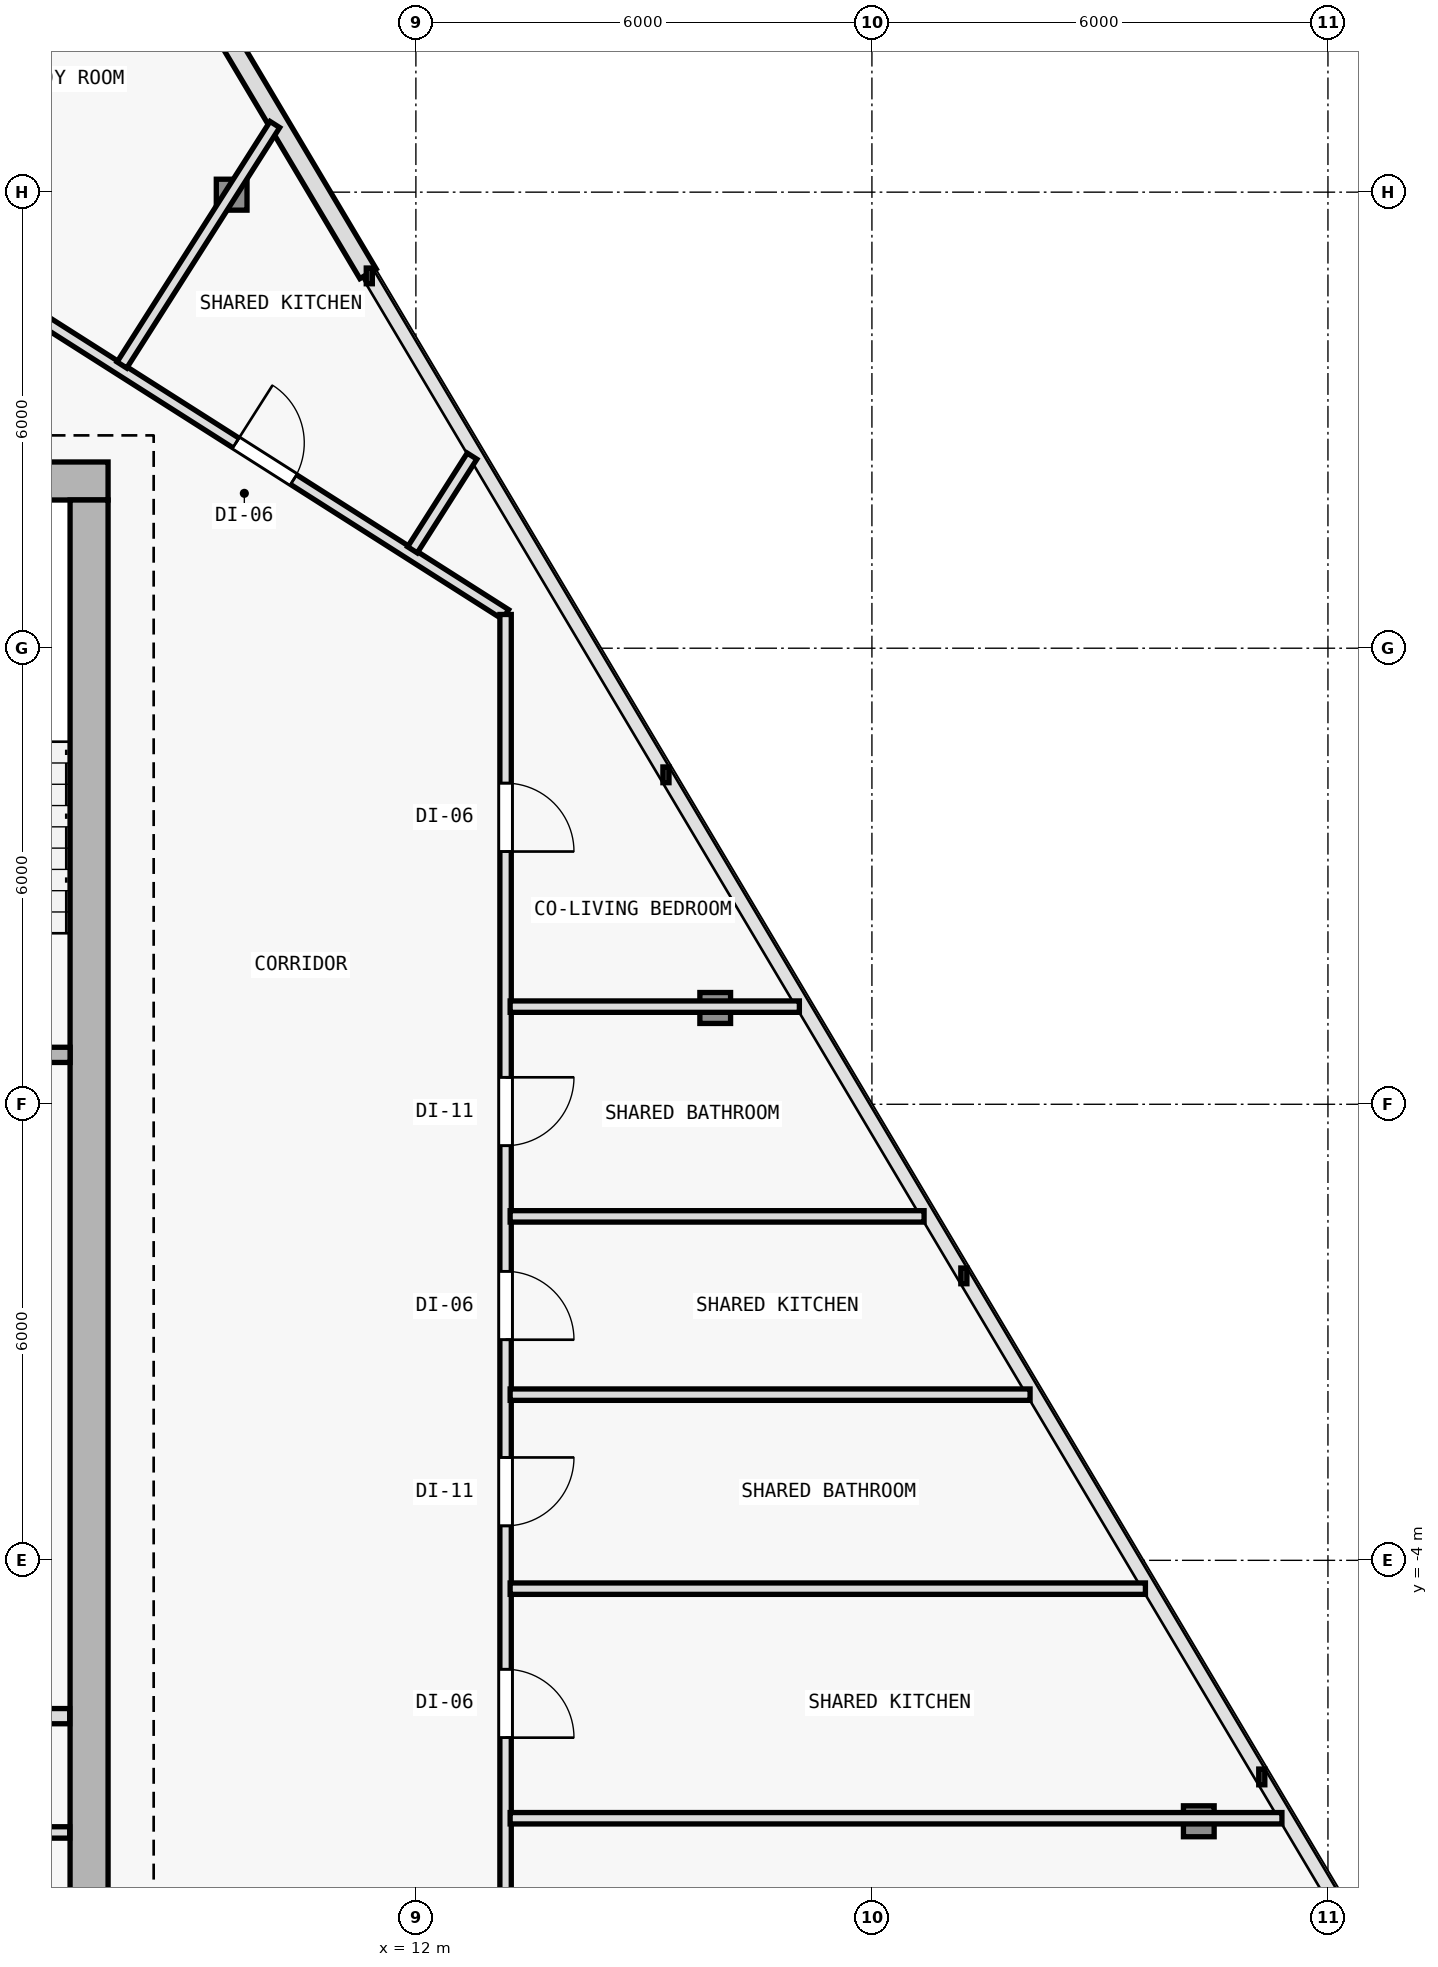
"""IFC4 building model, lengths in metres.
Left out: names, types, materials, properties, quantities, classifications, styles, units other than length and angle.
Written with IfcOpenShell. Run it as: python <this file> out.ifc"""

import sys

from ifc_helpers import new_model, si_unit, direction, frame, frame_2d, origin, origin_2d, place, context, subcontext, project, spatial, rectangle, i_section, extrude, element, fill, save


model = new_model("IFC4")
c1 = context("Model", 3, precision=1e-05, world=origin(), true_north=direction((0.0, 1.0)))
c2 = subcontext(c1, "Body", "Model", "MODEL_VIEW")
j1 = project(units=[si_unit("LENGTHUNIT", "METRE"), si_unit("PLANEANGLEUNIT", "RADIAN")], contexts=[c1])
p1 = place(None, origin())
s1 = spatial("IfcSite", under=j1, at=p1, CompositionType="ELEMENT")
p2 = place(p1, origin())
s2 = spatial("IfcBuilding", under=s1, at=p2, CompositionType="ELEMENT")
p3 = place(p2, frame((0.0, 0.0, 142.2)))
s3 = spatial("IfcBuildingStorey", under=s2, at=p3, CompositionType="ELEMENT", Elevation=142.2)
for number, where, z_axis, x_axis in (
    (1, (7.7, 10.2, 0.0), (0.0, 0.0, 1.0), (1.0, 0.0, 0.0)),
    (2, (7.7, 0.4, 0.0), (0.0, 0.0, 1.0), (1.0, 0.0, 0.0)),
):
    element("IfcColumn", number, at=place(p3, frame(where, z_axis=z_axis, x_axis=x_axis)), inside=s3, PredefinedType="COLUMN", context=c2, shape_type="SweptSolid", body=[
        extrude(i_section(OverallWidth=0.404, OverallDepth=0.407, WebThickness=0.017, FlangeThickness=0.028, FilletRadius=0.015, at=origin_2d()), origin(), (0.0, 0.0, 1.0), 3.6),
    ])
p4 = place(p3, frame((22.301, -7.433, 0.006), z_axis=(-0.026854414067, 0.022231375696, 0.99939211843), x_axis=(-0.637687438134, -0.770295223434, 0.0)))
e3 = element("IfcColumn", 3, at=p4, inside=s3, PredefinedType="COLUMN", context=c2, shape_type="SweptSolid", body=[
    extrude(i_section(OverallWidth=0.404, OverallDepth=0.407, WebThickness=0.017, FlangeThickness=0.028, FilletRadius=0.015, at=origin_2d()), origin(), (0.0, 0.0, 1.0), 3.591),
])
p5 = place(p3, frame((15.938, 3.267, 0.006), z_axis=(-0.019383182712, 0.009793608107, 0.999764160924), x_axis=(-0.45096771224, -0.892540263807, 0.0)))
e4 = element("IfcColumn", 4, at=p5, inside=s3, PredefinedType="COLUMN", context=c2, shape_type="SweptSolid", body=[
    extrude(i_section(OverallWidth=0.404, OverallDepth=0.407, WebThickness=0.017, FlangeThickness=0.028, FilletRadius=0.015, at=origin_2d()), origin(), (0.0, 0.0, 1.0), 3.59),
])
p6 = place(p3, frame((9.576, 13.967, 0.006), z_axis=(-0.012039901208, -0.002652859588, 0.999923998669), x_axis=(0.215177531037, -0.976574948551, 0.0)))
e5 = element("IfcColumn", 5, at=p6, inside=s3, PredefinedType="COLUMN", context=c2, shape_type="SweptSolid", body=[
    extrude(i_section(OverallWidth=0.404, OverallDepth=0.407, WebThickness=0.017, FlangeThickness=0.028, FilletRadius=0.015, at=origin_2d()), origin(), (0.0, 0.0, 1.0), 3.589),
])
p7 = place(p3, frame((5.862, 22.19, 0.0), z_axis=(0.0, 0.0, 1.0), x_axis=(0.511083986456, -0.859530778267, 0.0)))
e6 = element("IfcWall", 6, at=p7, inside=s3, PredefinedType="SOLIDWALL", context=c2, shape_type="SweptSolid", body=[
    extrude(rectangle(XDim=10.778, YDim=0.25, at=frame_2d((5.389, 0.0))), origin(), (0.0, 0.0, 1.0), 3.35),
])
p8 = place(p7, frame((4.839, 0.0, 0.62)))
e7 = element("IfcOpeningElement", 7, at=p8, cuts=e6, PredefinedType="OPENING", context=c2, shape_type="SweptSolid", body=[
    extrude(rectangle(XDim=1.1, YDim=1.8, at=frame_2d((0.55, 0.9))), frame((0.0, 0.135, 0.0), z_axis=(0.0, -1.0, 0.0), x_axis=(1.0, 0.0, 0.0)), (0.0, 0.0, 1.0), 0.27),
])
p9 = place(p3, frame((7.95, 10.2, 0.0), z_axis=(0.0, 0.0, 1.0), x_axis=(-1.0, 0.0, 0.0)))
e8 = element("IfcWall", 8, at=p9, inside=s3, PredefinedType="SHEAR", context=c2, shape_type="SweptSolid", body=[
    extrude(rectangle(XDim=15.9, YDim=0.5, at=frame_2d((7.95, 0.0))), origin(), (0.0, 0.0, 1.0), 3.35),
])
p10 = place(p9, frame((4.4, 0.0, 0.0)))
e9 = element("IfcOpeningElement", 9, at=p10, cuts=e8, PredefinedType="OPENING", context=c2, shape_type="SweptSolid", body=[
    extrude(rectangle(XDim=1.1, YDim=2.15, at=frame_2d((0.55, 1.075))), frame((0.0, 0.26, 0.0), z_axis=(0.0, -1.0, 0.0), x_axis=(1.0, 0.0, 0.0)), (0.0, 0.0, 1.0), 0.52),
])
p11 = place(p3, frame((7.7, 9.95, 0.0), z_axis=(0.0, 0.0, 1.0), x_axis=(0.0, -1.0, 0.0)))
e10 = element("IfcWall", 10, at=p11, inside=s3, PredefinedType="SHEAR", context=c2, shape_type="SweptSolid", body=[
    extrude(rectangle(XDim=19.1, YDim=0.5, at=frame_2d((9.55, 0.0))), origin(), (0.0, 0.0, 1.0), 3.35),
])
p12 = place(p3, frame((4.05, 2.65, 0.0), z_axis=(0.0, 0.0, 1.0), x_axis=(1.0, 0.0, 0.0)))
e11 = element("IfcWall", 11, at=p12, inside=s3, PredefinedType="SOLIDWALL", context=c2, shape_type="SweptSolid", body=[
    extrude(rectangle(XDim=3.4, YDim=0.2, at=frame_2d((1.7, 0.0))), origin(), (0.0, 0.0, 1.0), 3.35),
])
p13 = place(p3, frame((4.15, -6.05, 0.0), z_axis=(0.0, 0.0, 1.0), x_axis=(1.0, 0.0, 0.0)))
e12 = element("IfcWall", 12, at=p13, inside=s3, PredefinedType="SOLIDWALL", context=c2, shape_type="SweptSolid", body=[
    extrude(rectangle(XDim=3.295, YDim=0.2, at=frame_2d((1.647, 0.0))), origin(), (0.0, 0.0, 1.0), 3.35),
])
p14 = place(p3, frame((4.15, -7.58, 0.0), z_axis=(0.0, 0.0, 1.0), x_axis=(1.0, 0.0, 0.0)))
e13 = element("IfcWall", 13, at=p14, inside=s3, PredefinedType="PARTITIONING", context=c2, shape_type="SweptSolid", body=[
    extrude(rectangle(XDim=3.295, YDim=0.15, at=frame_2d((1.647, 0.0))), origin(), (0.0, 0.0, 1.0), 3.35),
])
p15 = place(p3, frame((7.023, 12.36, 0.0), z_axis=(0.0, 0.0, 1.0), x_axis=(0.84376480085, -0.536713108511, 0.0)))
e14 = element("IfcWall", 14, at=p15, inside=s3, PredefinedType="PARTITIONING", context=c2, shape_type="SweptSolid", body=[
    extrude(rectangle(XDim=7.297, YDim=0.15, at=frame_2d((3.648, 0.0))), origin(), (0.0, 0.0, 1.0), 2.885),
])
p16 = place(p15, frame((3.091, 0.0, 0.0)))
e15 = element("IfcOpeningElement", 15, at=p16, cuts=e14, PredefinedType="OPENING", context=c2, shape_type="SweptSolid", body=[
    extrude(rectangle(XDim=0.9, YDim=2.1, at=frame_2d((0.45, 1.05))), frame((0.0, 0.085, 0.0), z_axis=(0.0, -1.0, 0.0), x_axis=(1.0, 0.0, 0.0)), (0.0, 0.0, 1.0), 0.17),
])
p17 = place(p3, frame((13.18, 8.444, 0.0), z_axis=(0.0, 0.0, 1.0), x_axis=(0.0, -1.0, 0.0)))
e16 = element("IfcWall", 16, at=p17, inside=s3, PredefinedType="PARTITIONING", context=c2, shape_type="SweptSolid", body=[
    extrude(rectangle(XDim=20.004, YDim=0.15, at=frame_2d((10.002, 0.0))), origin(), (0.0, 0.0, 1.0), 2.705),
])
p18 = place(p17, frame((17.381, 0.0, 0.0)))
e17 = element("IfcOpeningElement", 17, at=p18, cuts=e16, PredefinedType="OPENING", context=c2, shape_type="SweptSolid", body=[
    extrude(rectangle(XDim=0.9, YDim=2.1, at=frame_2d((0.45, 1.05))), frame((0.0, 0.085, 0.0), z_axis=(0.0, -1.0, 0.0), x_axis=(1.0, 0.0, 0.0)), (0.0, 0.0, 1.0), 0.17),
])
p19 = place(p17, frame((13.877, 0.0, 0.0)))
e18 = element("IfcOpeningElement", 18, at=p19, cuts=e16, PredefinedType="OPENING", context=c2, shape_type="SweptSolid", body=[
    extrude(rectangle(XDim=0.9, YDim=2.1, at=frame_2d((0.45, 1.05))), frame((0.0, 0.085, 0.0), z_axis=(0.0, -1.0, 0.0), x_axis=(1.0, 0.0, 0.0)), (0.0, 0.0, 1.0), 0.17),
])
p20 = place(p17, frame((11.09, 0.0, 0.0)))
e19 = element("IfcOpeningElement", 19, at=p20, cuts=e16, PredefinedType="OPENING", context=c2, shape_type="SweptSolid", body=[
    extrude(rectangle(XDim=0.9, YDim=2.1, at=frame_2d((0.45, 1.05))), frame((0.0, 0.085, 0.0), z_axis=(0.0, -1.0, 0.0), x_axis=(1.0, 0.0, 0.0)), (0.0, 0.0, 1.0), 0.17),
])
p21 = place(p17, frame((8.642, 0.0, 0.0)))
e20 = element("IfcOpeningElement", 20, at=p21, cuts=e16, PredefinedType="OPENING", context=c2, shape_type="SweptSolid", body=[
    extrude(rectangle(XDim=0.9, YDim=2.1, at=frame_2d((0.45, 1.05))), frame((0.0, 0.085, 0.0), z_axis=(0.0, -1.0, 0.0), x_axis=(1.0, 0.0, 0.0)), (0.0, 0.0, 1.0), 0.17),
])
p22 = place(p17, frame((6.089, 0.0, 0.0)))
e21 = element("IfcOpeningElement", 21, at=p22, cuts=e16, PredefinedType="OPENING", context=c2, shape_type="SweptSolid", body=[
    extrude(rectangle(XDim=0.9, YDim=2.1, at=frame_2d((0.45, 1.05))), frame((0.0, 0.085, 0.0), z_axis=(0.0, -1.0, 0.0), x_axis=(1.0, 0.0, 0.0)), (0.0, 0.0, 1.0), 0.17),
])
p23 = place(p17, frame((2.219, 0.0, 0.0)))
e22 = element("IfcOpeningElement", 22, at=p23, cuts=e16, PredefinedType="OPENING", context=c2, shape_type="SweptSolid", body=[
    extrude(rectangle(XDim=0.9, YDim=2.1, at=frame_2d((0.45, 1.05))), frame((0.0, 0.085, 0.0), z_axis=(0.0, -1.0, 0.0), x_axis=(1.0, 0.0, 0.0)), (0.0, 0.0, 1.0), 0.17),
])
p24 = place(p3, frame((13.24, -7.393, 0.0), z_axis=(0.0, 0.0, 1.0), x_axis=(1.0, 0.0, 0.0)))
e23 = element("IfcWall", 23, at=p24, inside=s3, PredefinedType="PARTITIONING", context=c2, shape_type="SweptSolid", body=[
    extrude(rectangle(XDim=10.155, YDim=0.15, at=frame_2d((5.077, 0.0))), origin(), (0.0, 0.0, 1.0), 2.705),
])
p25 = place(p3, frame((13.24, 3.284, 0.0), z_axis=(0.0, 0.0, 1.0), x_axis=(1.0, 0.0, 0.0)))
e24 = element("IfcWall", 24, at=p25, inside=s3, PredefinedType="PARTITIONING", context=c2, shape_type="SweptSolid", body=[
    extrude(rectangle(XDim=3.805, YDim=0.15, at=frame_2d((1.903, 0.0))), origin(), (0.0, 0.0, 1.0), 2.885),
])
p26 = place(p3, frame((8.132, 11.726, 0.0), z_axis=(0.0, 0.0, 1.0), x_axis=(0.536677475356, 0.843787465803, 0.0)))
e25 = element("IfcWall", 25, at=p26, inside=s3, PredefinedType="PARTITIONING", context=c2, shape_type="SweptSolid", body=[
    extrude(rectangle(XDim=3.75, YDim=0.15, at=frame_2d((1.875, 0.0))), origin(), (0.0, 0.0, 1.0), 2.885),
])
p27 = place(p3, frame((13.24, -1.82, 0.0), z_axis=(0.0, 0.0, 1.0), x_axis=(1.0, 0.0, 0.0)))
e26 = element("IfcWall", 26, at=p27, inside=s3, PredefinedType="PARTITIONING", context=c2, shape_type="SweptSolid", body=[
    extrude(rectangle(XDim=6.841, YDim=0.15, at=frame_2d((3.42, 0.0))), origin(), (0.0, 0.0, 1.0), 2.885),
])
p28 = place(p3, frame((11.955, 9.294, 0.0), z_axis=(0.0, 0.0, 1.0), x_axis=(0.536637563854, 0.843812849547, 0.0)))
e27 = element("IfcWall", 27, at=p28, inside=s3, PredefinedType="PARTITIONING", context=c2, shape_type="SweptSolid", body=[
    extrude(rectangle(XDim=1.461, YDim=0.15, at=frame_2d((0.73, 0.0))), origin(), (0.0, 0.0, 1.0), 2.885),
])
p29 = place(p3, frame((13.24, -4.373, 0.0), z_axis=(0.0, 0.0, 1.0), x_axis=(1.0, 0.0, 0.0)))
e28 = element("IfcWall", 28, at=p29, inside=s3, PredefinedType="PARTITIONING", context=c2, shape_type="SweptSolid", body=[
    extrude(rectangle(XDim=8.358, YDim=0.15, at=frame_2d((4.179, 0.0))), origin(), (0.0, 0.0, 1.0), 2.885),
])
p30 = place(p3, frame((13.24, 0.525, 0.0), z_axis=(0.0, 0.0, 1.0), x_axis=(1.0, 0.0, 0.0)))
e29 = element("IfcWall", 29, at=p30, inside=s3, PredefinedType="PARTITIONING", context=c2, shape_type="SweptSolid", body=[
    extrude(rectangle(XDim=5.446, YDim=0.15, at=frame_2d((2.723, 0.0))), origin(), (0.0, 0.0, 1.0), 2.885),
])
p31 = place(p19, origin())
e30 = element("IfcDoor", 30, at=p31, inside=s3, OperationType="SINGLE_SWING_RIGHT", PredefinedType="DOOR", context=c2, shape_type="SweptSolid", body=[
    extrude(rectangle(XDim=0.9, YDim=2.1, at=frame_2d((0.45, 1.05))), frame((0.0, 0.025, 0.0), z_axis=(0.0, -1.0, 0.0), x_axis=(1.0, 0.0, 0.0)), (0.0, 0.0, 1.0), 0.05),
])
fill(e18, e30)
p32 = place(p20, origin())
e31 = element("IfcDoor", 31, at=p32, inside=s3, OperationType="SINGLE_SWING_LEFT", PredefinedType="DOOR", context=c2, shape_type="SweptSolid", body=[
    extrude(rectangle(XDim=0.9, YDim=2.1, at=frame_2d((0.45, 1.05))), frame((0.0, 0.025, 0.0), z_axis=(0.0, -1.0, 0.0), x_axis=(1.0, 0.0, 0.0)), (0.0, 0.0, 1.0), 0.05),
])
fill(e19, e31)
p33 = place(p21, origin())
e32 = element("IfcDoor", 32, at=p33, inside=s3, OperationType="SINGLE_SWING_RIGHT", PredefinedType="DOOR", context=c2, shape_type="SweptSolid", body=[
    extrude(rectangle(XDim=0.9, YDim=2.1, at=frame_2d((0.45, 1.05))), frame((0.0, 0.025, 0.0), z_axis=(0.0, -1.0, 0.0), x_axis=(1.0, 0.0, 0.0)), (0.0, 0.0, 1.0), 0.05),
])
fill(e20, e32)
p34 = place(p22, origin())
e33 = element("IfcDoor", 33, at=p34, inside=s3, OperationType="SINGLE_SWING_LEFT", PredefinedType="DOOR", context=c2, shape_type="SweptSolid", body=[
    extrude(rectangle(XDim=0.9, YDim=2.1, at=frame_2d((0.45, 1.05))), frame((0.0, 0.025, 0.0), z_axis=(0.0, -1.0, 0.0), x_axis=(1.0, 0.0, 0.0)), (0.0, 0.0, 1.0), 0.05),
])
fill(e21, e33)
p35 = place(p23, origin())
e34 = element("IfcDoor", 34, at=p35, inside=s3, OperationType="SINGLE_SWING_RIGHT", PredefinedType="DOOR", context=c2, shape_type="SweptSolid", body=[
    extrude(rectangle(XDim=0.9, YDim=2.1, at=frame_2d((0.45, 1.05))), frame((0.0, 0.025, 0.0), z_axis=(0.0, -1.0, 0.0), x_axis=(1.0, 0.0, 0.0)), (0.0, 0.0, 1.0), 0.05),
])
fill(e22, e34)
p36 = place(p16, origin())
e35 = element("IfcDoor", 35, at=p36, inside=s3, OperationType="SINGLE_SWING_LEFT", PredefinedType="DOOR", context=c2, shape_type="SweptSolid", body=[
    extrude(rectangle(XDim=0.9, YDim=2.1, at=frame_2d((0.45, 1.05))), frame((0.0, 0.025, 0.0), z_axis=(0.0, -1.0, 0.0), x_axis=(1.0, 0.0, 0.0)), (0.0, 0.0, 1.0), 0.05),
])
fill(e15, e35)
save(model, sys.argv[1])
